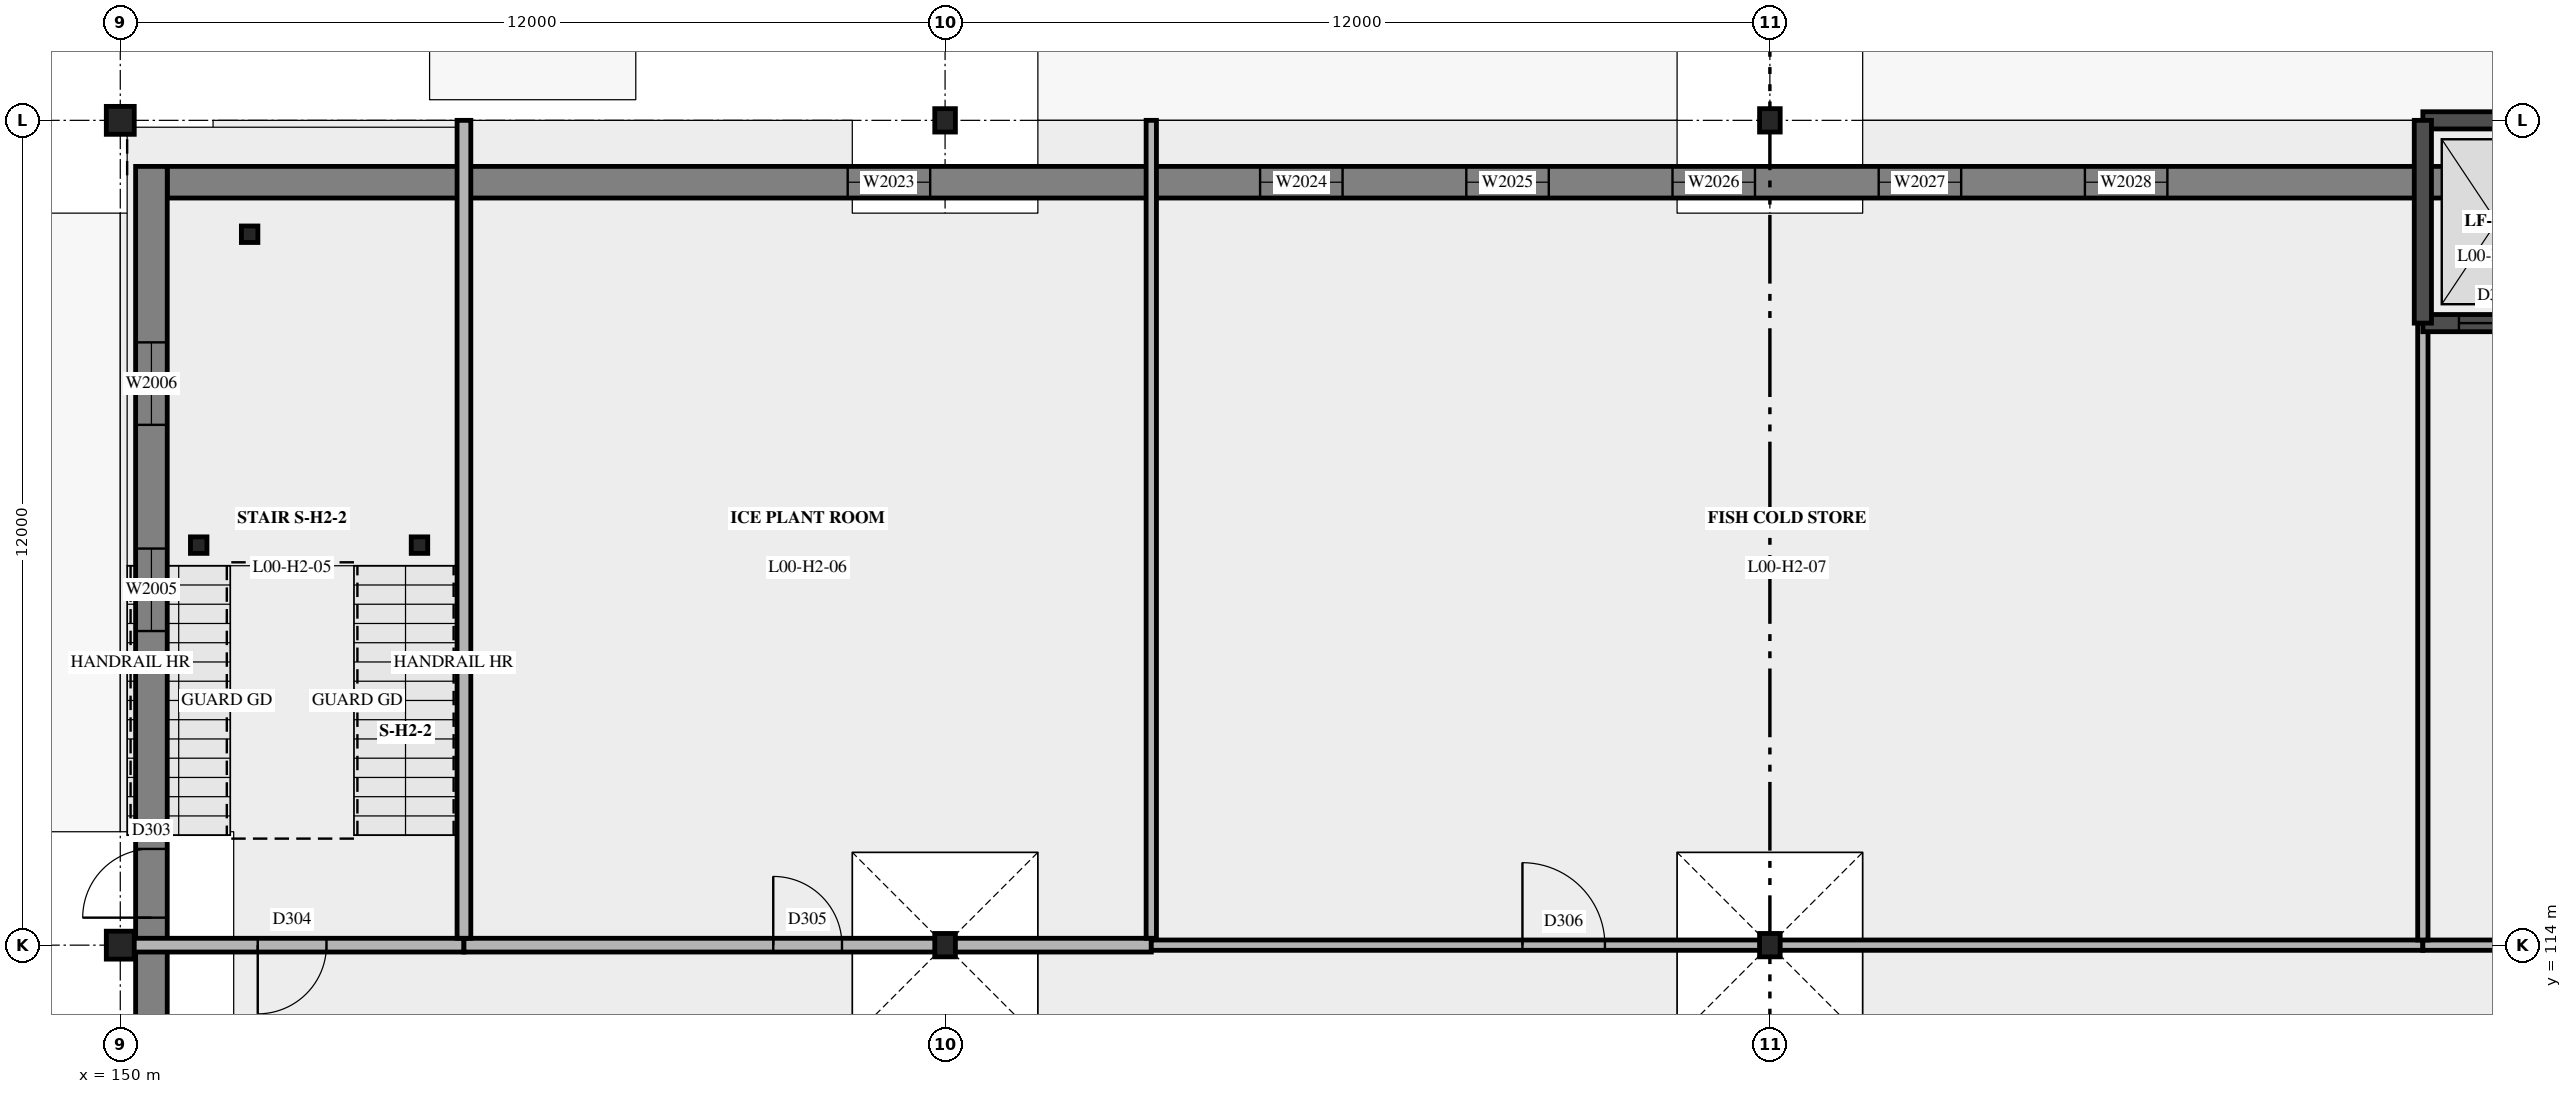
"""IFC4 building model, lengths in metres.
Left out: names, types, materials, properties, quantities, classifications, styles, units other than length and angle.
Written with IfcOpenShell. Run it as: python <this file> out.ifc"""

import sys

from ifc_helpers import new_model, si_unit, direction, frame, frame_2d, origin, origin_2d, place, context, subcontext, project, spatial, rectangle, hollow_circle, i_section, extrude, element, fill, save


model = new_model("IFC4")
c1 = context("Model", 3, precision=1e-05, world=origin(), true_north=direction((0.0, 1.0)))
c2 = subcontext(c1, "Body", "Model", "MODEL_VIEW")
j1 = project(units=[si_unit("LENGTHUNIT", "METRE"), si_unit("PLANEANGLEUNIT", "RADIAN")], contexts=[c1])
p1 = place(None, origin())
s1 = spatial("IfcSite", under=j1, at=p1, CompositionType="ELEMENT")
p2 = place(p1, origin())
s2 = spatial("IfcBuilding", under=s1, at=p2, CompositionType="ELEMENT")
p3 = place(p2, origin())
s3 = spatial("IfcBuildingStorey", under=s2, at=p3, CompositionType="ELEMENT", Elevation=0.0)
for number, where, z_axis, x_axis in (
    (1, (150.0, 114.0, 0.0), (0.0, 0.0, 1.0), (1.0, 0.0, 0.0)),
    (2, (150.0, 126.0, 0.0), (0.0, 0.0, 1.0), (1.0, 0.0, 0.0)),
):
    element("IfcColumn", number, at=place(p3, frame(where, z_axis=z_axis, x_axis=x_axis)), inside=s3, PredefinedType="COLUMN", context=c2, shape_type="SweptSolid", body=[
        extrude(hollow_circle(Radius=0.203, WallThickness=0.016, at=origin_2d()), origin(), (0.0, 0.0, 1.0), 5.4),
    ])
for number, where, z_axis, x_axis in (
    (3, (162.0, 114.0, 0.0), (0.0, 0.0, 1.0), (1.0, 0.0, 0.0)),
    (4, (162.0, 126.0, 0.0), (0.0, 0.0, 1.0), (1.0, 0.0, 0.0)),
    (5, (174.0, 114.0, 0.0), (0.0, 0.0, 1.0), (1.0, 0.0, 0.0)),
    (6, (174.0, 126.0, 0.0), (0.0, 0.0, 1.0), (1.0, 0.0, 0.0)),
):
    element("IfcColumn", number, at=place(p3, frame(where, z_axis=z_axis, x_axis=x_axis)), inside=s3, PredefinedType="COLUMN", context=c2, shape_type="SweptSolid", body=[
        extrude(i_section(OverallWidth=0.3, OverallDepth=0.34, WebThickness=0.012, FlangeThickness=0.021, at=origin_2d()), origin(), (0.0, 0.0, 1.0), 4.65),
    ])
p4 = place(p3, frame((150.683, 125.1, 0.0), z_axis=(0.0, 0.0, 1.0), x_axis=(1.0, 0.0, 0.0)))
e7 = element("IfcWall", 7, at=p4, inside=s3, PredefinedType="SOLIDWALL", context=c2, shape_type="SweptSolid", body=[
    extrude(rectangle(XDim=46.634, YDim=0.46, at=frame_2d((23.317, 0.0))), origin(), (0.0, 0.0, 1.0), 5.4),
])
p5 = place(p4, frame((9.9, 0.0, 0.9)))
e8 = element("IfcOpeningElement", 8, at=p5, cuts=e7, PredefinedType="OPENING", context=c2, shape_type="SweptSolid", body=[
    extrude(rectangle(XDim=1.2, YDim=3.3, at=frame_2d((0.6, 1.65))), frame((0.0, 0.24, 0.0), z_axis=(0.0, -1.0, 0.0), x_axis=(1.0, 0.0, 0.0)), (0.0, 0.0, 1.0), 0.48),
])
p6 = place(p4, frame((15.9, 0.0, 0.9)))
e9 = element("IfcOpeningElement", 9, at=p6, cuts=e7, PredefinedType="OPENING", context=c2, shape_type="SweptSolid", body=[
    extrude(rectangle(XDim=1.2, YDim=3.3, at=frame_2d((0.6, 1.65))), frame((0.0, 0.24, 0.0), z_axis=(0.0, -1.0, 0.0), x_axis=(1.0, 0.0, 0.0)), (0.0, 0.0, 1.0), 0.48),
])
p7 = place(p4, frame((18.9, 0.0, 0.9)))
e10 = element("IfcOpeningElement", 10, at=p7, cuts=e7, PredefinedType="OPENING", context=c2, shape_type="SweptSolid", body=[
    extrude(rectangle(XDim=1.2, YDim=3.3, at=frame_2d((0.6, 1.65))), frame((0.0, 0.24, 0.0), z_axis=(0.0, -1.0, 0.0), x_axis=(1.0, 0.0, 0.0)), (0.0, 0.0, 1.0), 0.48),
])
p8 = place(p4, frame((21.9, 0.0, 0.9)))
e11 = element("IfcOpeningElement", 11, at=p8, cuts=e7, PredefinedType="OPENING", context=c2, shape_type="SweptSolid", body=[
    extrude(rectangle(XDim=1.2, YDim=3.3, at=frame_2d((0.6, 1.65))), frame((0.0, 0.24, 0.0), z_axis=(0.0, -1.0, 0.0), x_axis=(1.0, 0.0, 0.0)), (0.0, 0.0, 1.0), 0.48),
])
p9 = place(p4, frame((24.9, 0.0, 0.9)))
e12 = element("IfcOpeningElement", 12, at=p9, cuts=e7, PredefinedType="OPENING", context=c2, shape_type="SweptSolid", body=[
    extrude(rectangle(XDim=1.2, YDim=3.3, at=frame_2d((0.6, 1.65))), frame((0.0, 0.24, 0.0), z_axis=(0.0, -1.0, 0.0), x_axis=(1.0, 0.0, 0.0)), (0.0, 0.0, 1.0), 0.48),
])
p10 = place(p4, frame((27.9, 0.0, 0.9)))
e13 = element("IfcOpeningElement", 13, at=p10, cuts=e7, PredefinedType="OPENING", context=c2, shape_type="SweptSolid", body=[
    extrude(rectangle(XDim=1.2, YDim=3.3, at=frame_2d((0.6, 1.65))), frame((0.0, 0.24, 0.0), z_axis=(0.0, -1.0, 0.0), x_axis=(1.0, 0.0, 0.0)), (0.0, 0.0, 1.0), 0.48),
])
p11 = place(p3, frame((150.453, 78.67, 0.0), z_axis=(0.0, 0.0, 1.0), x_axis=(0.0, 1.0, 0.0)))
e14 = element("IfcWall", 14, at=p11, inside=s3, PredefinedType="SOLIDWALL", context=c2, shape_type="SweptSolid", body=[
    extrude(rectangle(XDim=46.66, YDim=0.46, at=frame_2d((23.33, 0.0))), origin(), (0.0, 0.0, 1.0), 5.4),
])
p12 = place(p11, frame((35.73, 0.0, 0.0)))
e15 = element("IfcOpeningElement", 15, at=p12, cuts=e14, PredefinedType="OPENING", context=c2, shape_type="SweptSolid", body=[
    extrude(rectangle(XDim=1.0, YDim=2.1, at=frame_2d((0.5, 1.05))), frame((0.0, 0.24, 0.0), z_axis=(0.0, -1.0, 0.0), x_axis=(1.0, 0.0, 0.0)), (0.0, 0.0, 1.0), 0.48),
])
p13 = place(p11, frame((16.13, 0.0, 0.0)))
e16 = element("IfcOpeningElement", 16, at=p13, cuts=e14, PredefinedType="OPENING", context=c2, shape_type="SweptSolid", body=[
    extrude(rectangle(XDim=2.4, YDim=2.4, at=frame_2d((1.2, 1.2))), frame((0.0, 0.24, 0.0), z_axis=(0.0, -1.0, 0.0), x_axis=(1.0, 0.0, 0.0)), (0.0, 0.0, 1.0), 0.48),
])
p14 = place(p11, frame((8.83, 0.0, 0.0)))
e17 = element("IfcOpeningElement", 17, at=p14, cuts=e14, PredefinedType="OPENING", context=c2, shape_type="SweptSolid", body=[
    extrude(rectangle(XDim=1.0, YDim=2.1, at=frame_2d((0.5, 1.05))), frame((0.0, 0.24, 0.0), z_axis=(0.0, -1.0, 0.0), x_axis=(1.0, 0.0, 0.0)), (0.0, 0.0, 1.0), 0.48),
])
p15 = place(p11, frame((24.83, 0.0, 0.0)))
e18 = element("IfcOpeningElement", 18, at=p15, cuts=e14, PredefinedType="OPENING", context=c2, shape_type="SweptSolid", body=[
    extrude(rectangle(XDim=1.0, YDim=2.1, at=frame_2d((0.5, 1.05))), frame((0.0, 0.24, 0.0), z_axis=(0.0, -1.0, 0.0), x_axis=(1.0, 0.0, 0.0)), (0.0, 0.0, 1.0), 0.48),
])
p16 = place(p11, frame((31.43, 0.0, 0.0)))
e19 = element("IfcOpeningElement", 19, at=p16, cuts=e14, PredefinedType="OPENING", context=c2, shape_type="SweptSolid", body=[
    extrude(rectangle(XDim=1.8, YDim=2.1, at=frame_2d((0.9, 1.05))), frame((0.0, 0.24, 0.0), z_axis=(0.0, -1.0, 0.0), x_axis=(1.0, 0.0, 0.0)), (0.0, 0.0, 1.0), 0.48),
])
p17 = place(p11, frame((3.9, 0.0, 0.9)))
e20 = element("IfcOpeningElement", 20, at=p17, cuts=e14, PredefinedType="OPENING", context=c2, shape_type="SweptSolid", body=[
    extrude(rectangle(XDim=1.2, YDim=3.3, at=frame_2d((0.6, 1.65))), frame((0.0, 0.24, 0.0), z_axis=(0.0, -1.0, 0.0), x_axis=(1.0, 0.0, 0.0)), (0.0, 0.0, 1.0), 0.48),
])
p18 = place(p11, frame((27.9, 0.0, 0.9)))
e21 = element("IfcOpeningElement", 21, at=p18, cuts=e14, PredefinedType="OPENING", context=c2, shape_type="SweptSolid", body=[
    extrude(rectangle(XDim=1.2, YDim=3.3, at=frame_2d((0.6, 1.65))), frame((0.0, 0.24, 0.0), z_axis=(0.0, -1.0, 0.0), x_axis=(1.0, 0.0, 0.0)), (0.0, 0.0, 1.0), 0.48),
])
p19 = place(p11, frame((39.9, 0.0, 0.9)))
e22 = element("IfcOpeningElement", 22, at=p19, cuts=e14, PredefinedType="OPENING", context=c2, shape_type="SweptSolid", body=[
    extrude(rectangle(XDim=1.2, YDim=3.3, at=frame_2d((0.6, 1.65))), frame((0.0, 0.24, 0.0), z_axis=(0.0, -1.0, 0.0), x_axis=(1.0, 0.0, 0.0)), (0.0, 0.0, 1.0), 0.48),
])
p20 = place(p11, frame((42.9, 0.0, 0.9)))
e23 = element("IfcOpeningElement", 23, at=p20, cuts=e14, PredefinedType="OPENING", context=c2, shape_type="SweptSolid", body=[
    extrude(rectangle(XDim=1.2, YDim=3.3, at=frame_2d((0.6, 1.65))), frame((0.0, 0.24, 0.0), z_axis=(0.0, -1.0, 0.0), x_axis=(1.0, 0.0, 0.0)), (0.0, 0.0, 1.0), 0.48),
])
p21 = place(p3, frame((150.0, 114.0, 0.0), z_axis=(0.0, 0.0, 1.0), x_axis=(1.0, 0.0, 0.0)))
e24 = element("IfcWall", 24, at=p21, inside=s3, PredefinedType="PARTITIONING", context=c2, shape_type="SweptSolid", body=[
    extrude(rectangle(XDim=5.0, YDim=0.2, at=frame_2d((2.5, 0.0))), origin(), (0.0, 0.0, 1.0), 4.65),
])
p22 = place(p21, frame((2.0, 0.0, 0.0)))
e25 = element("IfcOpeningElement", 25, at=p22, cuts=e24, PredefinedType="OPENING", context=c2, shape_type="SweptSolid", body=[
    extrude(rectangle(XDim=1.0, YDim=2.1, at=frame_2d((0.5, 1.05))), frame((0.0, 0.11, 0.0), z_axis=(0.0, -1.0, 0.0), x_axis=(1.0, 0.0, 0.0)), (0.0, 0.0, 1.0), 0.22),
])
p23 = place(p3, frame((155.0, 114.0, 0.0), z_axis=(0.0, 0.0, 1.0), x_axis=(1.0, 0.0, 0.0)))
e26 = element("IfcWall", 26, at=p23, inside=s3, PredefinedType="PARTITIONING", context=c2, shape_type="SweptSolid", body=[
    extrude(rectangle(XDim=10.0, YDim=0.2, at=frame_2d((5.0, 0.0))), origin(), (0.0, 0.0, 1.0), 4.65),
])
p24 = place(p23, frame((4.5, 0.0, 0.0)))
e27 = element("IfcOpeningElement", 27, at=p24, cuts=e26, PredefinedType="OPENING", context=c2, shape_type="SweptSolid", body=[
    extrude(rectangle(XDim=1.0, YDim=2.1, at=frame_2d((0.5, 1.05))), frame((0.0, 0.11, 0.0), z_axis=(0.0, -1.0, 0.0), x_axis=(1.0, 0.0, 0.0)), (0.0, 0.0, 1.0), 0.22),
])
p25 = place(p3, frame((165.0, 114.0, 0.0), z_axis=(0.0, 0.0, 1.0), x_axis=(1.0, 0.0, 0.0)))
e28 = element("IfcWall", 28, at=p25, inside=s3, PredefinedType="PARTITIONING", context=c2, shape_type="SweptSolid", body=[
    extrude(rectangle(XDim=18.5, YDim=0.15, at=frame_2d((9.25, 0.0))), origin(), (0.0, 0.0, 1.0), 4.65),
])
p26 = place(p25, frame((5.4, 0.0, 0.0)))
e29 = element("IfcOpeningElement", 29, at=p26, cuts=e28, PredefinedType="OPENING", context=c2, shape_type="SweptSolid", body=[
    extrude(rectangle(XDim=1.2, YDim=2.4, at=frame_2d((0.6, 1.2))), frame((0.0, 0.085, 0.0), z_axis=(0.0, -1.0, 0.0), x_axis=(1.0, 0.0, 0.0)), (0.0, 0.0, 1.0), 0.17),
])
p27 = place(p3, frame((183.5, 114.0, 0.0), z_axis=(0.0, 0.0, 1.0), x_axis=(1.0, 0.0, 0.0)))
e30 = element("IfcWall", 30, at=p27, inside=s3, PredefinedType="PARTITIONING", context=c2, shape_type="SweptSolid", body=[
    extrude(rectangle(XDim=9.7, YDim=0.15, at=frame_2d((4.85, 0.0))), origin(), (0.0, 0.0, 1.0), 4.65),
])
p28 = place(p27, frame((5.6, 0.0, 0.0)))
e31 = element("IfcOpeningElement", 31, at=p28, cuts=e30, PredefinedType="OPENING", context=c2, shape_type="SweptSolid", body=[
    extrude(rectangle(XDim=1.8, YDim=2.1, at=frame_2d((0.9, 1.05))), frame((0.0, 0.085, 0.0), z_axis=(0.0, -1.0, 0.0), x_axis=(1.0, 0.0, 0.0)), (0.0, 0.0, 1.0), 0.17),
])
p29 = place(p3, frame((155.0, 114.1, 0.0), z_axis=(0.0, 0.0, 1.0), x_axis=(0.0, 1.0, 0.0)))
e32 = element("IfcWall", 32, at=p29, inside=s3, PredefinedType="PARTITIONING", context=c2, shape_type="SweptSolid", body=[
    extrude(rectangle(XDim=11.9, YDim=0.2, at=frame_2d((5.95, 0.0))), origin(), (0.0, 0.0, 1.0), 5.15),
])
p30 = place(p3, frame((165.0, 114.1, 0.0), z_axis=(0.0, 0.0, 1.0), x_axis=(0.0, 1.0, 0.0)))
e33 = element("IfcWall", 33, at=p30, inside=s3, PredefinedType="PARTITIONING", context=c2, shape_type="SweptSolid", body=[
    extrude(rectangle(XDim=11.9, YDim=0.15, at=frame_2d((5.95, 0.0))), origin(), (0.0, 0.0, 1.0), 4.75),
])
p31 = place(p3, frame((183.5, 114.075, 0.0), z_axis=(0.0, 0.0, 1.0), x_axis=(0.0, 1.0, 0.0)))
e34 = element("IfcWall", 34, at=p31, inside=s3, PredefinedType="PARTITIONING", context=c2, shape_type="SweptSolid", body=[
    extrude(rectangle(XDim=8.975, YDim=0.15, at=frame_2d((4.488, 0.0))), origin(), (0.0, 0.0, 1.0), 4.75),
])
p32 = place(p3, frame((185.65, 126.0, -1.4), z_axis=(0.0, 0.0, 1.0), x_axis=(-1.0, 0.0, 0.0)))
e35 = element("IfcWall", 35, at=p32, inside=s3, PredefinedType="SHEAR", context=c2, shape_type="SweptSolid", body=[
    extrude(rectangle(XDim=2.15, YDim=0.25, at=frame_2d((1.075, 0.0))), origin(), (0.0, 0.0, 1.0), 6.8),
])
p33 = place(p3, frame((183.5, 123.05, -1.4), z_axis=(0.0, 0.0, 1.0), x_axis=(1.0, 0.0, 0.0)))
e36 = element("IfcWall", 36, at=p33, inside=s3, PredefinedType="SHEAR", context=c2, shape_type="SweptSolid", body=[
    extrude(rectangle(XDim=2.15, YDim=0.25, at=frame_2d((1.075, 0.0))), origin(), (0.0, 0.0, 1.0), 6.8),
])
p34 = place(p33, frame((0.525, 0.0, 1.4)))
e37 = element("IfcOpeningElement", 37, at=p34, cuts=e36, PredefinedType="OPENING", context=c2, shape_type="SweptSolid", body=[
    extrude(rectangle(XDim=1.1, YDim=2.1, at=frame_2d((0.55, 1.05))), frame((0.0, 0.135, 0.0), z_axis=(0.0, -1.0, 0.0), x_axis=(1.0, 0.0, 0.0)), (0.0, 0.0, 1.0), 0.27),
])
p35 = place(p3, frame((183.5, 126.0, -1.4), z_axis=(0.0, 0.0, 1.0), x_axis=(0.0, -1.0, 0.0)))
e38 = element("IfcWall", 38, at=p35, inside=s3, PredefinedType="SHEAR", context=c2, shape_type="SweptSolid", body=[
    extrude(rectangle(XDim=2.95, YDim=0.25, at=frame_2d((1.475, 0.0))), origin(), (0.0, 0.0, 1.0), 6.8),
])
for number, where, z_axis, x_axis in (
    (39, (151.141, 119.82, 0.0), (0.0, 0.0, 1.0), (1.0, 0.0, 0.0)),
    (40, (151.882, 124.343, 0.0), (0.0, 0.0, 1.0), (1.0, 0.0, 0.0)),
    (41, (154.353, 119.82, 0.0), (0.0, 0.0, 1.0), (1.0, 0.0, 0.0)),
):
    element("IfcColumn", number, at=place(p3, frame(where, z_axis=z_axis, x_axis=x_axis)), inside=s3, PredefinedType="COLUMN", context=c2, shape_type="SweptSolid", body=[
        extrude(i_section(OverallWidth=0.24, OverallDepth=0.24, WebThickness=0.01, FlangeThickness=0.017, at=origin_2d()), origin(), (0.0, 0.0, 1.0), 2.5),
    ])
p36 = place(p12, origin())
e42 = element("IfcDoor", 42, at=p36, inside=s3, OperationType="SINGLE_SWING_LEFT", PredefinedType="DOOR", context=c2, shape_type="SweptSolid", body=[
    extrude(rectangle(XDim=1.0, YDim=2.1, at=frame_2d((0.5, 1.05))), frame((0.0, 0.025, 0.0), z_axis=(0.0, -1.0, 0.0), x_axis=(1.0, 0.0, 0.0)), (0.0, 0.0, 1.0), 0.05),
])
fill(e15, e42)
p37 = place(p19, origin())
e43 = element("IfcWindow", 43, at=p37, inside=s3, PartitioningType="SINGLE_PANEL", PredefinedType="WINDOW", context=c2, shape_type="SweptSolid", body=[
    extrude(rectangle(XDim=1.2, YDim=3.3, at=frame_2d((0.6, 1.65))), frame((0.0, 0.03, 0.0), z_axis=(0.0, -1.0, 0.0), x_axis=(1.0, 0.0, 0.0)), (0.0, 0.0, 1.0), 0.06),
])
fill(e22, e43)
p38 = place(p20, origin())
e44 = element("IfcWindow", 44, at=p38, inside=s3, PartitioningType="SINGLE_PANEL", PredefinedType="WINDOW", context=c2, shape_type="SweptSolid", body=[
    extrude(rectangle(XDim=1.2, YDim=3.3, at=frame_2d((0.6, 1.65))), frame((0.0, 0.03, 0.0), z_axis=(0.0, -1.0, 0.0), x_axis=(1.0, 0.0, 0.0)), (0.0, 0.0, 1.0), 0.06),
])
fill(e23, e44)
p39 = place(p5, origin())
e45 = element("IfcWindow", 45, at=p39, inside=s3, PartitioningType="SINGLE_PANEL", PredefinedType="WINDOW", context=c2, shape_type="SweptSolid", body=[
    extrude(rectangle(XDim=1.2, YDim=3.3, at=frame_2d((0.6, 1.65))), frame((0.0, 0.03, 0.0), z_axis=(0.0, -1.0, 0.0), x_axis=(1.0, 0.0, 0.0)), (0.0, 0.0, 1.0), 0.06),
])
fill(e8, e45)
p40 = place(p6, origin())
e46 = element("IfcWindow", 46, at=p40, inside=s3, PartitioningType="SINGLE_PANEL", PredefinedType="WINDOW", context=c2, shape_type="SweptSolid", body=[
    extrude(rectangle(XDim=1.2, YDim=3.3, at=frame_2d((0.6, 1.65))), frame((0.0, 0.03, 0.0), z_axis=(0.0, -1.0, 0.0), x_axis=(1.0, 0.0, 0.0)), (0.0, 0.0, 1.0), 0.06),
])
fill(e9, e46)
p41 = place(p7, origin())
e47 = element("IfcWindow", 47, at=p41, inside=s3, PartitioningType="SINGLE_PANEL", PredefinedType="WINDOW", context=c2, shape_type="SweptSolid", body=[
    extrude(rectangle(XDim=1.2, YDim=3.3, at=frame_2d((0.6, 1.65))), frame((0.0, 0.03, 0.0), z_axis=(0.0, -1.0, 0.0), x_axis=(1.0, 0.0, 0.0)), (0.0, 0.0, 1.0), 0.06),
])
fill(e10, e47)
p42 = place(p8, origin())
e48 = element("IfcWindow", 48, at=p42, inside=s3, PartitioningType="SINGLE_PANEL", PredefinedType="WINDOW", context=c2, shape_type="SweptSolid", body=[
    extrude(rectangle(XDim=1.2, YDim=3.3, at=frame_2d((0.6, 1.65))), frame((0.0, 0.03, 0.0), z_axis=(0.0, -1.0, 0.0), x_axis=(1.0, 0.0, 0.0)), (0.0, 0.0, 1.0), 0.06),
])
fill(e11, e48)
p43 = place(p9, origin())
e49 = element("IfcWindow", 49, at=p43, inside=s3, PartitioningType="SINGLE_PANEL", PredefinedType="WINDOW", context=c2, shape_type="SweptSolid", body=[
    extrude(rectangle(XDim=1.2, YDim=3.3, at=frame_2d((0.6, 1.65))), frame((0.0, 0.03, 0.0), z_axis=(0.0, -1.0, 0.0), x_axis=(1.0, 0.0, 0.0)), (0.0, 0.0, 1.0), 0.06),
])
fill(e12, e49)
p44 = place(p10, origin())
e50 = element("IfcWindow", 50, at=p44, inside=s3, PartitioningType="SINGLE_PANEL", PredefinedType="WINDOW", context=c2, shape_type="SweptSolid", body=[
    extrude(rectangle(XDim=1.2, YDim=3.3, at=frame_2d((0.6, 1.65))), frame((0.0, 0.03, 0.0), z_axis=(0.0, -1.0, 0.0), x_axis=(1.0, 0.0, 0.0)), (0.0, 0.0, 1.0), 0.06),
])
fill(e13, e50)
p45 = place(p22, origin())
e51 = element("IfcDoor", 51, at=p45, inside=s3, OperationType="SINGLE_SWING_RIGHT", PredefinedType="DOOR", context=c2, shape_type="SweptSolid", body=[
    extrude(rectangle(XDim=1.0, YDim=2.1, at=frame_2d((0.5, 1.05))), frame((0.0, 0.025, 0.0), z_axis=(0.0, -1.0, 0.0), x_axis=(1.0, 0.0, 0.0)), (0.0, 0.0, 1.0), 0.05),
])
fill(e25, e51)
p46 = place(p24, origin())
e52 = element("IfcDoor", 52, at=p46, inside=s3, OperationType="SINGLE_SWING_LEFT", PredefinedType="DOOR", context=c2, shape_type="SweptSolid", body=[
    extrude(rectangle(XDim=1.0, YDim=2.1, at=frame_2d((0.5, 1.05))), frame((0.0, 0.025, 0.0), z_axis=(0.0, -1.0, 0.0), x_axis=(1.0, 0.0, 0.0)), (0.0, 0.0, 1.0), 0.05),
])
fill(e27, e52)
p47 = place(p26, origin())
e53 = element("IfcDoor", 53, at=p47, inside=s3, OperationType="SINGLE_SWING_LEFT", PredefinedType="DOOR", context=c2, shape_type="SweptSolid", body=[
    extrude(rectangle(XDim=1.2, YDim=2.4, at=frame_2d((0.6, 1.2))), frame((0.0, 0.025, 0.0), z_axis=(0.0, -1.0, 0.0), x_axis=(1.0, 0.0, 0.0)), (0.0, 0.0, 1.0), 0.05),
])
fill(e29, e53)
p48 = place(p34, origin())
e54 = element("IfcDoor", 54, at=p48, inside=s3, OperationType="SLIDING_TO_LEFT", PredefinedType="DOOR", context=c2, shape_type="SweptSolid", body=[
    extrude(rectangle(XDim=1.1, YDim=2.1, at=frame_2d((0.55, 1.05))), frame((0.0, 0.025, 0.0), z_axis=(0.0, -1.0, 0.0), x_axis=(1.0, 0.0, 0.0)), (0.0, 0.0, 1.0), 0.05),
])
fill(e37, e54)
save(model, sys.argv[1])
